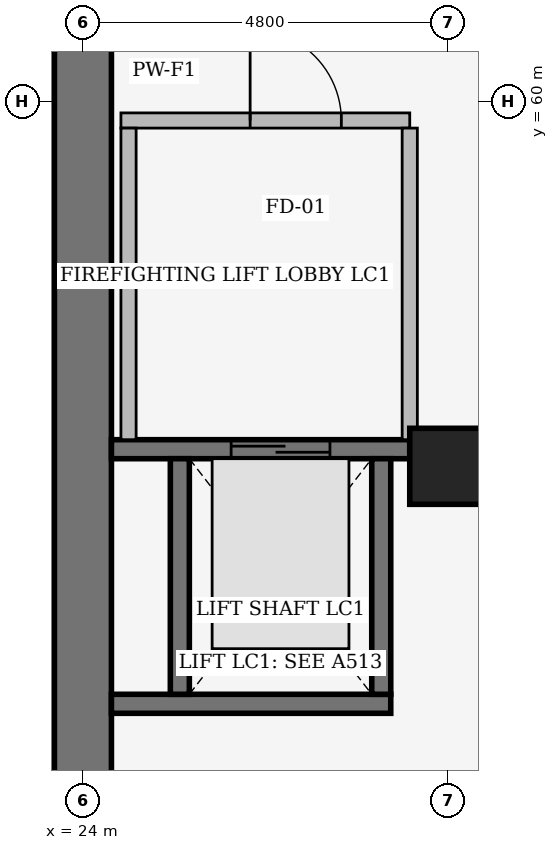
"""IFC4 building model, lengths in metres.
Left out: names, types, materials, properties, quantities, classifications, styles, units other than length and angle.
Written with IfcOpenShell. Run it as: python <this file> out.ifc"""

import sys

from ifc_helpers import new_model, si_unit, direction, frame, frame_2d, origin, origin_2d, place, context, subcontext, project, spatial, rectangle, extrude, element, fill, save


model = new_model("IFC4")
c1 = context("Model", 3, precision=1e-05, world=origin(), true_north=direction((0.0, 1.0)))
c2 = subcontext(c1, "Body", "Model", "MODEL_VIEW")
j1 = project(units=[si_unit("LENGTHUNIT", "METRE"), si_unit("PLANEANGLEUNIT", "RADIAN")], contexts=[c1])
p1 = place(None, origin())
s1 = spatial("IfcSite", under=j1, at=p1, CompositionType="ELEMENT")
p2 = place(p1, origin())
s2 = spatial("IfcBuilding", under=s1, at=p2, CompositionType="ELEMENT")
p3 = place(p2, frame((0.0, 0.0, -9.6)))
s3 = spatial("IfcBuildingStorey", under=s2, at=p3, CompositionType="ELEMENT", Elevation=-9.6)
p4 = place(p3, frame((28.8, 55.2, 0.0), z_axis=(0.0, 0.0, 1.0), x_axis=(1.0, 0.0, 0.0)))
e1 = element("IfcColumn", 1, at=p4, inside=s3, PredefinedType="COLUMN", context=c2, shape_type="SweptSolid", body=[
    extrude(rectangle(XDim=1.0, YDim=1.0, at=origin_2d()), origin(), (0.0, 0.0, 1.0), 4.8),
])
p5 = place(p3, frame((24.0, 50.85, 0.0), z_axis=(0.0, 0.0, 1.0), x_axis=(0.0, 1.0, 0.0)))
e2 = element("IfcWall", 2, at=p5, inside=s3, PredefinedType="SOLIDWALL", context=c2, shape_type="SweptSolid", body=[
    extrude(rectangle(XDim=18.3, YDim=0.75, at=frame_2d((9.15, 0.0))), origin(), (0.0, 0.0, 1.0), 4.4),
])
p6 = place(p3, frame((24.375, 52.075, 0.0), z_axis=(0.0, 0.0, 1.0), x_axis=(1.0, 0.0, 0.0)))
e3 = element("IfcWall", 3, at=p6, inside=s3, PredefinedType="SHEAR", context=c2, shape_type="SweptSolid", body=[
    extrude(rectangle(XDim=3.675, YDim=0.25, at=frame_2d((1.837, 0.0))), origin(), (0.0, 0.0, 1.0), 4.4),
])
p7 = place(p3, frame((24.375, 55.425, 0.0), z_axis=(0.0, 0.0, 1.0), x_axis=(1.0, 0.0, 0.0)))
e4 = element("IfcWall", 4, at=p7, inside=s3, PredefinedType="SHEAR", context=c2, shape_type="SweptSolid", body=[
    extrude(rectangle(XDim=3.925, YDim=0.25, at=frame_2d((1.962, 0.0))), origin(), (0.0, 0.0, 1.0), 4.4),
])
p8 = place(p7, frame((1.575, 0.0, 0.0)))
e5 = element("IfcOpeningElement", 5, at=p8, cuts=e4, PredefinedType="OPENING", context=c2, shape_type="SweptSolid", body=[
    extrude(rectangle(XDim=1.3, YDim=2.2, at=frame_2d((0.65, 1.1))), frame((0.0, 0.135, 0.0), z_axis=(0.0, -1.0, 0.0), x_axis=(1.0, 0.0, 0.0)), (0.0, 0.0, 1.0), 0.27),
])
for number, where, z_axis, x_axis in (
    (6, (25.275, 52.2, 0.0), (0.0, 0.0, 1.0), (0.0, 1.0, 0.0)),
    (7, (27.925, 52.2, 0.0), (0.0, 0.0, 1.0), (0.0, 1.0, 0.0)),
):
    element("IfcWall", number, at=place(p3, frame(where, z_axis=z_axis, x_axis=x_axis)), inside=s3, PredefinedType="SHEAR", context=c2, shape_type="SweptSolid", body=[
        extrude(rectangle(XDim=3.1, YDim=0.25, at=frame_2d((1.55, 0.0))), origin(), (0.0, 0.0, 1.0), 4.4),
    ])
p9 = place(p3, frame((24.5, 59.75, 0.0), z_axis=(0.0, 0.0, 1.0), x_axis=(1.0, 0.0, 0.0)))
e8 = element("IfcWall", 8, at=p9, inside=s3, PredefinedType="PARTITIONING", context=c2, shape_type="SweptSolid", body=[
    extrude(rectangle(XDim=3.8, YDim=0.2, at=frame_2d((1.9, 0.0))), origin(), (0.0, 0.0, 1.0), 3.466),
])
p10 = place(p9, frame((1.7, 0.0, 0.0)))
e9 = element("IfcOpeningElement", 9, at=p10, cuts=e8, PredefinedType="OPENING", context=c2, shape_type="SweptSolid", body=[
    extrude(rectangle(XDim=1.2, YDim=2.2, at=frame_2d((0.6, 1.1))), frame((0.0, 0.11, 0.0), z_axis=(0.0, -1.0, 0.0), x_axis=(1.0, 0.0, 0.0)), (0.0, 0.0, 1.0), 0.22),
])
p11 = place(p3, frame((24.6, 55.55, 0.0), z_axis=(0.0, 0.0, 1.0), x_axis=(0.0, 1.0, 0.0)))
e10 = element("IfcWall", 10, at=p11, inside=s3, PredefinedType="PARTITIONING", context=c2, shape_type="SweptSolid", body=[
    extrude(rectangle(XDim=4.1, YDim=0.2, at=frame_2d((2.05, 0.0))), origin(), (0.0, 0.0, 1.0), 4.44),
])
p12 = place(p3, frame((28.3, 55.55, 0.0), z_axis=(0.0, 0.0, 1.0), x_axis=(0.0, 1.0, 0.0)))
e11 = element("IfcWall", 11, at=p12, inside=s3, PredefinedType="PARTITIONING", context=c2, shape_type="SweptSolid", body=[
    extrude(rectangle(XDim=4.1, YDim=0.2, at=frame_2d((2.05, 0.0))), origin(), (0.0, 0.0, 1.0), 3.466),
])
p13 = place(p8, origin())
e12 = element("IfcDoor", 12, at=p13, inside=s3, OperationType="DOUBLE_DOOR_SLIDING", PredefinedType="DOOR", context=c2, shape_type="SweptSolid", body=[
    extrude(rectangle(XDim=1.3, YDim=2.2, at=frame_2d((0.65, 1.1))), frame((0.0, 0.025, 0.0), z_axis=(0.0, -1.0, 0.0), x_axis=(1.0, 0.0, 0.0)), (0.0, 0.0, 1.0), 0.05),
])
fill(e5, e12)
p14 = place(p10, origin())
e13 = element("IfcDoor", 13, at=p14, inside=s3, OperationType="SINGLE_SWING_LEFT", PredefinedType="DOOR", context=c2, shape_type="SweptSolid", body=[
    extrude(rectangle(XDim=1.2, YDim=2.2, at=frame_2d((0.6, 1.1))), frame((0.0, 0.025, 0.0), z_axis=(0.0, -1.0, 0.0), x_axis=(1.0, 0.0, 0.0)), (0.0, 0.0, 1.0), 0.05),
])
fill(e9, e13)
save(model, sys.argv[1])
